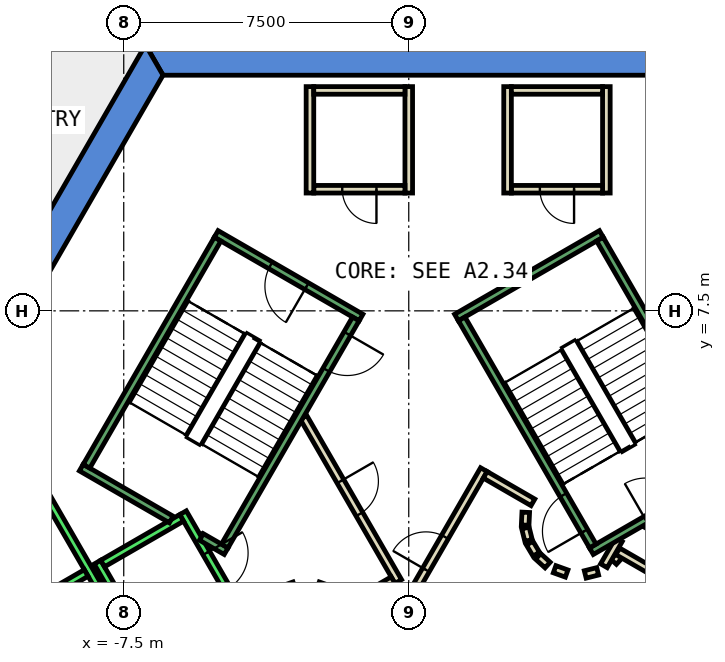
"""IFC4 building model, lengths in metres.
Left out: names, types, materials, properties, quantities, classifications, styles, units other than length and angle.
Written with IfcOpenShell. Run it as: python <this file> out.ifc"""

import sys

from ifc_helpers import new_model, si_unit, direction, frame, frame_2d, origin, place, context, subcontext, project, spatial, polyline, rectangle, outline, extrude, element, fill, save


model = new_model("IFC4")
c1 = context("Model", 3, precision=1e-05, world=origin(), true_north=direction((0.0, 1.0)))
c2 = subcontext(c1, "Body", "Model", "MODEL_VIEW")
j1 = project(units=[si_unit("LENGTHUNIT", "METRE"), si_unit("PLANEANGLEUNIT", "RADIAN")], contexts=[c1])
p1 = place(None, origin())
s1 = spatial("IfcSite", under=j1, at=p1, CompositionType="ELEMENT")
p2 = place(p1, origin())
s2 = spatial("IfcBuilding", under=s1, at=p2, CompositionType="ELEMENT")
p3 = place(p2, frame((0.0, 0.0, 167.6)))
s3 = spatial("IfcBuildingStorey", under=s2, at=p3, CompositionType="ELEMENT", Elevation=167.6)
p4 = place(p3, frame((0.0, 0.0, -0.4)))
e1 = element("IfcWall", 1, at=p4, inside=s3, PredefinedType="SHEAR", context=c2, shape_type="SweptSolid", body=[
    extrude(outline(polyline([(6.928, 14.5), (-6.928, 14.5), (-6.466, 13.7), (6.466, 13.7), (6.928, 14.5)])), origin(), (0.0, 0.0, 1.0), 4.2),
])
p5 = place(p3, frame((0.0, 0.0, -0.4)))
e2 = element("IfcWall", 2, at=p5, inside=s3, PredefinedType="SHEAR", context=c2, shape_type="SweptSolid", body=[
    extrude(outline(polyline([(-12.267, 5.252), (-11.575, 4.852), (-6.466, 13.7), (-6.928, 14.5), (-12.267, 5.252)])), origin(), (0.0, 0.0, 1.0), 4.2),
])
p6 = place(p3, frame((0.0, 0.0, -0.4)))
e3 = element("IfcWall", 3, at=p6, inside=s3, PredefinedType="SHEAR", context=c2, shape_type="SweptSolid", body=[
    extrude(outline(polyline([(-13.856, 2.5), (-6.928, -9.5), (-6.466, -8.7), (-12.933, 2.5), (-13.856, 2.5)])), origin(), (0.0, 0.0, 1.0), 4.2),
])
p7 = place(p3, frame((5.2, 13.4, 0.0), z_axis=(0.0, 0.0, 1.0), x_axis=(0.0, -1.0, 0.0)))
e4 = element("IfcWall", 4, at=p7, inside=s3, PredefinedType="PARTITIONING", context=c2, shape_type="SweptSolid", body=[
    extrude(rectangle(XDim=2.8, YDim=0.2, at=frame_2d((1.4, 0.0))), origin(), (0.0, 0.0, 1.0), 3.8),
])
p8 = place(p3, frame((5.1, 10.7, 0.0), z_axis=(0.0, 0.0, 1.0), x_axis=(-1.0, 0.0, 0.0)))
e5 = element("IfcWall", 5, at=p8, inside=s3, PredefinedType="PARTITIONING", context=c2, shape_type="SweptSolid", body=[
    extrude(rectangle(XDim=2.4, YDim=0.2, at=frame_2d((1.2, 0.0))), origin(), (0.0, 0.0, 1.0), 3.8),
])
p9 = place(p8, frame((0.75, 0.0, 0.0)))
e6 = element("IfcOpeningElement", 6, at=p9, cuts=e5, PredefinedType="OPENING", context=c2, shape_type="SweptSolid", body=[
    extrude(rectangle(XDim=0.9, YDim=2.1, at=frame_2d((0.45, 1.05))), frame((0.0, 0.11, 0.0), z_axis=(0.0, -1.0, 0.0), x_axis=(1.0, 0.0, 0.0)), (0.0, 0.0, 1.0), 0.22),
])
p10 = place(p3, frame((2.6, 10.6, 0.0), z_axis=(0.0, 0.0, 1.0), x_axis=(0.0, 1.0, 0.0)))
e7 = element("IfcWall", 7, at=p10, inside=s3, PredefinedType="PARTITIONING", context=c2, shape_type="SweptSolid", body=[
    extrude(rectangle(XDim=2.8, YDim=0.2, at=frame_2d((1.4, 0.0))), origin(), (0.0, 0.0, 1.0), 3.8),
])
p11 = place(p3, frame((2.7, 13.3, 0.0), z_axis=(0.0, 0.0, 1.0), x_axis=(1.0, 0.0, 0.0)))
e8 = element("IfcWall", 8, at=p11, inside=s3, PredefinedType="PARTITIONING", context=c2, shape_type="SweptSolid", body=[
    extrude(rectangle(XDim=2.4, YDim=0.2, at=frame_2d((1.2, 0.0))), origin(), (0.0, 0.0, 1.0), 3.8),
])
p12 = place(p3, frame((0.0, 13.4, 0.0), z_axis=(0.0, 0.0, 1.0), x_axis=(0.0, -1.0, 0.0)))
e9 = element("IfcWall", 9, at=p12, inside=s3, PredefinedType="PARTITIONING", context=c2, shape_type="SweptSolid", body=[
    extrude(rectangle(XDim=2.8, YDim=0.2, at=frame_2d((1.4, 0.0))), origin(), (0.0, 0.0, 1.0), 3.8),
])
p13 = place(p3, frame((-0.1, 10.7, 0.0), z_axis=(0.0, 0.0, 1.0), x_axis=(-1.0, 0.0, 0.0)))
e10 = element("IfcWall", 10, at=p13, inside=s3, PredefinedType="PARTITIONING", context=c2, shape_type="SweptSolid", body=[
    extrude(rectangle(XDim=2.4, YDim=0.2, at=frame_2d((1.2, 0.0))), origin(), (0.0, 0.0, 1.0), 3.8),
])
p14 = place(p13, frame((0.75, 0.0, 0.0)))
e11 = element("IfcOpeningElement", 11, at=p14, cuts=e10, PredefinedType="OPENING", context=c2, shape_type="SweptSolid", body=[
    extrude(rectangle(XDim=0.9, YDim=2.1, at=frame_2d((0.45, 1.05))), frame((0.0, 0.11, 0.0), z_axis=(0.0, -1.0, 0.0), x_axis=(1.0, 0.0, 0.0)), (0.0, 0.0, 1.0), 0.22),
])
p15 = place(p3, frame((-2.6, 10.6, 0.0), z_axis=(0.0, 0.0, 1.0), x_axis=(0.0, 1.0, 0.0)))
e12 = element("IfcWall", 12, at=p15, inside=s3, PredefinedType="PARTITIONING", context=c2, shape_type="SweptSolid", body=[
    extrude(rectangle(XDim=2.8, YDim=0.2, at=frame_2d((1.4, 0.0))), origin(), (0.0, 0.0, 1.0), 3.8),
])
p16 = place(p3, frame((-2.5, 13.3, 0.0), z_axis=(0.0, 0.0, 1.0), x_axis=(1.0, 0.0, 0.0)))
e13 = element("IfcWall", 13, at=p16, inside=s3, PredefinedType="PARTITIONING", context=c2, shape_type="SweptSolid", body=[
    extrude(rectangle(XDim=2.4, YDim=0.2, at=frame_2d((1.2, 0.0))), origin(), (0.0, 0.0, 1.0), 3.8),
])
p17 = place(p3, frame((5.39, 0.898, 0.0), z_axis=(0.0, 0.0, 1.0), x_axis=(0.673828488714, 0.738887791073, 0.0)))
e14 = element("IfcWall", 14, at=p17, inside=s3, PredefinedType="PARTITIONING", context=c2, shape_type="SweptSolid", body=[
    extrude(rectangle(XDim=0.263, YDim=0.2, at=frame_2d((0.131, 0.0))), origin(), (0.0, 0.0, 1.0), 3.8),
])
p18 = place(p3, frame((5.499, 1.172, 0.0), z_axis=(0.0, 0.0, 1.0), x_axis=(0.866333505267, -0.499465972466, 0.0)))
e15 = element("IfcWall", 15, at=p18, inside=s3, PredefinedType="PARTITIONING", context=c2, shape_type="SweptSolid", body=[
    extrude(rectangle(XDim=1.374, YDim=0.2, at=frame_2d((0.687, 0.0))), origin(), (0.0, 0.0, 1.0), 3.8),
])
p19 = place(p3, frame((6.826, 0.522, 0.0), z_axis=(0.0, 0.0, 1.0), x_axis=(-0.500016722714, -0.866015748706, 0.0)))
e16 = element("IfcWall", 16, at=p19, inside=s3, PredefinedType="PARTITIONING", context=c2, shape_type="SweptSolid", body=[
    extrude(rectangle(XDim=1.7, YDim=0.2, at=frame_2d((0.85, 0.0))), origin(), (0.0, 0.0, 1.0), 3.8),
])
p20 = place(p3, frame((6.25, 1.894, 0.0), z_axis=(0.0, 0.0, 1.0), x_axis=(0.866043184279, -0.499969202016, 0.0)))
e17 = element("IfcWall", 17, at=p20, inside=s3, PredefinedType="PARTITIONING", context=c2, shape_type="SweptSolid", body=[
    extrude(rectangle(XDim=2.084, YDim=0.2, at=frame_2d((1.042, 0.0))), origin(), (0.0, 0.0, 1.0), 3.8),
])
p21 = place(p20, frame((0.642, 0.0, 0.0)))
e18 = element("IfcOpeningElement", 18, at=p21, cuts=e17, PredefinedType="OPENING", context=c2, shape_type="SweptSolid", body=[
    extrude(rectangle(XDim=0.9, YDim=2.1, at=frame_2d((0.45, 1.05))), frame((0.0, 0.11, 0.0), z_axis=(0.0, -1.0, 0.0), x_axis=(1.0, 0.0, 0.0)), (0.0, 0.0, 1.0), 0.22),
])
p22 = place(p3, frame((5.135, 0.793, 0.0), z_axis=(0.0, 0.0, 1.0), x_axis=(0.499526442893, 0.866298639529, 0.0)))
e19 = element("IfcWall", 19, at=p22, inside=s3, PredefinedType="PARTITIONING", context=c2, shape_type="SweptSolid", body=[
    extrude(rectangle(XDim=0.791, YDim=0.2, at=frame_2d((0.396, 0.0))), origin(), (0.0, 0.0, 1.0), 3.8),
])
p23 = place(p3, frame((-0.52, -1.0, 0.0), z_axis=(0.0, 0.0, 1.0), x_axis=(0.50011622646, 0.865958290007, 0.0)))
e20 = element("IfcWall", 20, at=p23, inside=s3, PredefinedType="PARTITIONING", context=c2, shape_type="SweptSolid", body=[
    extrude(rectangle(XDim=4.991, YDim=0.2, at=frame_2d((2.496, 0.0))), origin(), (0.0, 0.0, 1.0), 3.8),
])
p24 = place(p23, frame((1.945, 0.0, 0.0)))
e21 = element("IfcOpeningElement", 21, at=p24, cuts=e20, PredefinedType="OPENING", context=c2, shape_type="SweptSolid", body=[
    extrude(rectangle(XDim=1.0, YDim=2.1, at=frame_2d((0.5, 1.05))), frame((0.0, 0.11, 0.0), z_axis=(0.0, -1.0, 0.0), x_axis=(1.0, 0.0, 0.0)), (0.0, 0.0, 1.0), 0.22),
])
p25 = place(p3, frame((2.012, 3.186, 0.0), z_axis=(0.0, 0.0, 1.0), x_axis=(0.865891012941, -0.500232699559, 0.0)))
e22 = element("IfcWall", 22, at=p25, inside=s3, PredefinedType="PARTITIONING", context=c2, shape_type="SweptSolid", body=[
    extrude(rectangle(XDim=1.449, YDim=0.2, at=frame_2d((0.725, 0.0))), origin(), (0.0, 0.0, 1.0), 3.8),
])
p26 = place(p3, frame((3.079, 2.199, 0.0), z_axis=(0.0, 0.0, 1.0), x_axis=(-0.047771483479, -0.998858290933, 0.0)))
e23 = element("IfcWall", 23, at=p26, inside=s3, PredefinedType="PARTITIONING", context=c2, shape_type="SweptSolid", body=[
    extrude(rectangle(XDim=0.337, YDim=0.2, at=frame_2d((0.169, 0.0))), origin(), (0.0, 0.0, 1.0), 3.8),
])
p27 = place(p3, frame((3.07, 1.786, 0.0), z_axis=(0.0, 0.0, 1.0), x_axis=(0.242705583207, -0.970099994784, 0.0)))
e24 = element("IfcWall", 24, at=p27, inside=s3, PredefinedType="PARTITIONING", context=c2, shape_type="SweptSolid", body=[
    extrude(rectangle(XDim=0.338, YDim=0.2, at=frame_2d((0.169, 0.0))), origin(), (0.0, 0.0, 1.0), 3.8),
])
for number, where, z_axis, x_axis in (
    (25, (3.182, 1.388, 0.0), (0.0, 0.0, 1.0), (0.512, -0.859, 0.0)),
    (26, (3.404, 1.039, 0.0), (0.0, 0.0, 1.0), (0.74, -0.672, 0.0)),
):
    element("IfcWall", number, at=place(p3, frame(where, z_axis=z_axis, x_axis=x_axis)), inside=s3, PredefinedType="PARTITIONING", context=c2, shape_type="SweptSolid", body=[
        extrude(rectangle(XDim=0.338, YDim=0.2, at=frame_2d((0.169, 0.0))), origin(), (0.0, 0.0, 1.0), 3.8),
    ])
p28 = place(p3, frame((3.838, 0.702, 0.0), z_axis=(0.0, 0.0, 1.0), x_axis=(0.941035081519, -0.338308993895, 0.0)))
e27 = element("IfcWall", 27, at=p28, inside=s3, PredefinedType="PARTITIONING", context=c2, shape_type="SweptSolid", body=[
    extrude(rectangle(XDim=0.337, YDim=0.2, at=frame_2d((0.168, 0.0))), origin(), (0.0, 0.0, 1.0), 3.8),
])
p29 = place(p3, frame((4.644, 0.564, 0.0), z_axis=(0.0, 0.0, 1.0), x_axis=(0.969929076366, 0.243387729394, 0.0)))
e28 = element("IfcWall", 28, at=p29, inside=s3, PredefinedType="PARTITIONING", context=c2, shape_type="SweptSolid", body=[
    extrude(rectangle(XDim=0.337, YDim=0.2, at=frame_2d((0.168, 0.0))), origin(), (0.0, 0.0, 1.0), 3.8),
])
p30 = place(p3, frame((-2.771, 4.7, 0.0), z_axis=(0.0, 0.0, 1.0), x_axis=(0.499969479948, -0.866043023828, 0.0)))
e29 = element("IfcWall", 29, at=p30, inside=s3, PredefinedType="PARTITIONING", context=c2, shape_type="SweptSolid", body=[
    extrude(rectangle(XDim=4.99, YDim=0.2, at=frame_2d((2.495, 0.0))), origin(), (0.0, 0.0, 1.0), 3.8),
])
p31 = place(p30, frame((1.945, 0.0, 0.0)))
e30 = element("IfcOpeningElement", 30, at=p31, cuts=e29, PredefinedType="OPENING", context=c2, shape_type="SweptSolid", body=[
    extrude(rectangle(XDim=1.0, YDim=2.1, at=frame_2d((0.5, 1.05))), frame((0.0, 0.11, 0.0), z_axis=(0.0, -1.0, 0.0), x_axis=(1.0, 0.0, 0.0)), (0.0, 0.0, 1.0), 0.22),
])
p32 = place(p3, frame((-0.412, 0.414, 0.0), z_axis=(0.0, 0.0, 1.0), x_axis=(-0.866017369001, -0.500013916395, 0.0)))
e31 = element("IfcWall", 31, at=p32, inside=s3, PredefinedType="PARTITIONING", context=c2, shape_type="SweptSolid", body=[
    extrude(rectangle(XDim=1.45, YDim=0.2, at=frame_2d((0.725, 0.0))), origin(), (0.0, 0.0, 1.0), 3.8),
])
p33 = place(p3, frame((-2.07, 0.16, 0.0), z_axis=(0.0, 0.0, 1.0), x_axis=(-0.942199461132, 0.335052496547, 0.0)))
e32 = element("IfcWall", 32, at=p33, inside=s3, PredefinedType="PARTITIONING", context=c2, shape_type="SweptSolid", body=[
    extrude(rectangle(XDim=0.337, YDim=0.2, at=frame_2d((0.169, 0.0))), origin(), (0.0, 0.0, 1.0), 3.8),
])
p34 = place(p3, frame((-3.012, 0.273, 0.0), z_axis=(0.0, 0.0, 1.0), x_axis=(-0.942280615813, -0.334824194261, 0.0)))
e33 = element("IfcWall", 33, at=p34, inside=s3, PredefinedType="PARTITIONING", context=c2, shape_type="SweptSolid", body=[
    extrude(rectangle(XDim=0.338, YDim=0.2, at=frame_2d((0.169, 0.0))), origin(), (0.0, 0.0, 1.0), 3.8),
])
p35 = place(p3, frame((-5.94, 2.188, 0.0), z_axis=(0.0, 0.0, 1.0), x_axis=(0.49994636267, -0.866056369097, 0.0)))
e34 = element("IfcWall", 34, at=p35, inside=s3, PredefinedType="STANDARD", context=c2, shape_type="SweptSolid", body=[
    extrude(rectangle(XDim=2.8, YDim=0.2, at=frame_2d((1.4, 0.0))), origin(), (0.0, 0.0, 1.0), 3.8),
])
p36 = place(p35, frame((1.225, 0.0, 0.0)))
e35 = element("IfcOpeningElement", 35, at=p36, cuts=e34, PredefinedType="OPENING", context=c2, shape_type="SweptSolid", body=[
    extrude(rectangle(XDim=1.1, YDim=2.1, at=frame_2d((0.55, 1.05))), frame((0.0, 0.11, 0.0), z_axis=(0.0, -1.0, 0.0), x_axis=(1.0, 0.0, 0.0)), (0.0, 0.0, 1.0), 0.22),
])
p37 = place(p3, frame((-8.192, 0.888, 0.0), z_axis=(0.0, 0.0, 1.0), x_axis=(0.49994636267, -0.866056369097, 0.0)))
e36 = element("IfcWall", 36, at=p37, inside=s3, PredefinedType="STANDARD", context=c2, shape_type="SweptSolid", body=[
    extrude(rectangle(XDim=2.8, YDim=0.2, at=frame_2d((1.4, 0.0))), origin(), (0.0, 0.0, 1.0), 3.8),
])
p38 = place(p3, frame((-5.977, 2.052, 0.0), z_axis=(0.0, 0.0, 1.0), x_axis=(-0.865973769406, -0.500089422704, 0.0)))
e37 = element("IfcWall", 37, at=p38, inside=s3, PredefinedType="STANDARD", context=c2, shape_type="SweptSolid", body=[
    extrude(rectangle(XDim=2.399, YDim=0.2, at=frame_2d((1.2, 0.0))), origin(), (0.0, 0.0, 1.0), 3.8),
])
p39 = place(p3, frame((-9.751, 2.99, 0.0), z_axis=(0.0, 0.0, 1.0), x_axis=(0.50000090737, -0.866024879913, 0.0)))
e38 = element("IfcWall", 38, at=p39, inside=s3, PredefinedType="STANDARD", context=c2, shape_type="SweptSolid", body=[
    extrude(rectangle(XDim=10.6, YDim=0.2, at=frame_2d((5.3, 0.0))), origin(), (0.0, 0.0, 1.0), 3.8),
])
p40 = place(p3, frame((-8.488, 0.602, 0.0), z_axis=(0.0, 0.0, 1.0), x_axis=(-0.866022959057, -0.500004234368, 0.0)))
e39 = element("IfcWall", 39, at=p40, inside=s3, PredefinedType="STANDARD", context=c2, shape_type="SweptSolid", body=[
    extrude(rectangle(XDim=2.5, YDim=0.2, at=frame_2d((1.25, 0.0))), origin(), (0.0, 0.0, 1.0), 3.8),
])
p41 = place(p3, frame((4.451, -6.19, 0.0), z_axis=(0.0, 0.0, 1.0), x_axis=(0.50000090737, 0.866024879913, 0.0)))
e40 = element("IfcWall", 40, at=p41, inside=s3, PredefinedType="STANDARD", context=c2, shape_type="SweptSolid", body=[
    extrude(rectangle(XDim=10.6, YDim=0.2, at=frame_2d((5.3, 0.0))), origin(), (0.0, 0.0, 1.0), 3.8),
])
p42 = place(p3, frame((4.806, 1.176, 0.0), z_axis=(0.0, 0.0, 1.0), x_axis=(0.866059941101, 0.499940174841, 0.0)))
e41 = element("IfcWall", 41, at=p42, inside=s3, PredefinedType="STANDARD", context=c2, shape_type="SweptSolid", body=[
    extrude(rectangle(XDim=4.4, YDim=0.2, at=frame_2d((2.2, 0.0))), origin(), (0.0, 0.0, 1.0), 3.8),
])
p43 = place(p42, frame((1.65, 0.0, 0.0)))
e42 = element("IfcOpeningElement", 42, at=p43, cuts=e41, PredefinedType="OPENING", context=c2, shape_type="SweptSolid", body=[
    extrude(rectangle(XDim=1.1, YDim=2.2, at=frame_2d((0.55, 1.1))), frame((0.0, 0.11, 0.0), z_axis=(0.0, -1.0, 0.0), x_axis=(1.0, 0.0, 0.0)), (0.0, 0.0, 1.0), 0.22),
])
p44 = place(p3, frame((1.256, 7.324, 0.0), z_axis=(0.0, 0.0, 1.0), x_axis=(0.866046073146, 0.499964197906, 0.0)))
e43 = element("IfcWall", 43, at=p44, inside=s3, PredefinedType="STANDARD", context=c2, shape_type="SweptSolid", body=[
    extrude(rectangle(XDim=4.4, YDim=0.2, at=frame_2d((2.2, 0.0))), origin(), (0.0, 0.0, 1.0), 3.8),
])
p45 = place(p3, frame((4.843, 1.312, 0.0), z_axis=(0.0, 0.0, 1.0), x_axis=(-0.499963383562, 0.866046543262, 0.0)))
e44 = element("IfcWall", 44, at=p45, inside=s3, PredefinedType="STANDARD", context=c2, shape_type="SweptSolid", body=[
    extrude(rectangle(XDim=6.9, YDim=0.2, at=frame_2d((3.45, 0.0))), origin(), (0.0, 0.0, 1.0), 3.8),
])
p46 = place(p45, frame((0.45, 0.0, 0.0)))
e45 = element("IfcOpeningElement", 45, at=p46, cuts=e44, PredefinedType="OPENING", context=c2, shape_type="SweptSolid", body=[
    extrude(rectangle(XDim=1.1, YDim=2.2, at=frame_2d((0.55, 1.1))), frame((0.0, 0.11, 0.0), z_axis=(0.0, -1.0, 0.0), x_axis=(1.0, 0.0, 0.0)), (0.0, 0.0, 1.0), 0.22),
])
p47 = place(p3, frame((8.48, 3.412, 0.0), z_axis=(0.0, 0.0, 1.0), x_axis=(-0.499978703459, 0.866037698999, 0.0)))
e46 = element("IfcWall", 46, at=p47, inside=s3, PredefinedType="STANDARD", context=c2, shape_type="SweptSolid", body=[
    extrude(rectangle(XDim=6.9, YDim=0.2, at=frame_2d((3.45, 0.0))), origin(), (0.0, 0.0, 1.0), 3.8),
])
p48 = place(p3, frame((-1.256, 7.324, 0.0), z_axis=(0.0, 0.0, 1.0), x_axis=(-0.866046073146, 0.499964197906, 0.0)))
e47 = element("IfcWall", 47, at=p48, inside=s3, PredefinedType="STANDARD", context=c2, shape_type="SweptSolid", body=[
    extrude(rectangle(XDim=4.4, YDim=0.2, at=frame_2d((2.2, 0.0))), origin(), (0.0, 0.0, 1.0), 3.8),
])
p49 = place(p48, frame((1.65, 0.0, 0.0)))
e48 = element("IfcOpeningElement", 48, at=p49, cuts=e47, PredefinedType="OPENING", context=c2, shape_type="SweptSolid", body=[
    extrude(rectangle(XDim=1.1, YDim=2.2, at=frame_2d((0.55, 1.1))), frame((0.0, 0.11, 0.0), z_axis=(0.0, -1.0, 0.0), x_axis=(1.0, 0.0, 0.0)), (0.0, 0.0, 1.0), 0.22),
])
p50 = place(p3, frame((-6.25, 2.01, 0.0), z_axis=(0.0, 0.0, 1.0), x_axis=(-0.86611865017, 0.499838457731, 0.0)))
e49 = element("IfcWall", 49, at=p50, inside=s3, PredefinedType="STANDARD", context=c2, shape_type="SweptSolid", body=[
    extrude(rectangle(XDim=2.733, YDim=0.2, at=frame_2d((1.366, 0.0))), origin(), (0.0, 0.0, 1.0), 3.8),
])
p51 = place(p3, frame((-4.806, 1.176, 0.0), z_axis=(0.0, 0.0, 1.0), x_axis=(-0.866558586415, 0.499075361355, 0.0)))
e50 = element("IfcWall", 50, at=p51, inside=s3, PredefinedType="STANDARD", context=c2, shape_type="SweptSolid", body=[
    extrude(rectangle(XDim=0.751, YDim=0.2, at=frame_2d((0.376, 0.0))), origin(), (0.0, 0.0, 1.0), 3.8),
])
p52 = place(p3, frame((-1.393, 7.288, 0.0), z_axis=(0.0, 0.0, 1.0), x_axis=(-0.499963383562, -0.866046543262, 0.0)))
e51 = element("IfcWall", 51, at=p52, inside=s3, PredefinedType="STANDARD", context=c2, shape_type="SweptSolid", body=[
    extrude(rectangle(XDim=6.9, YDim=0.2, at=frame_2d((3.45, 0.0))), origin(), (0.0, 0.0, 1.0), 3.8),
])
p53 = place(p52, frame((0.45, 0.0, 0.0)))
e52 = element("IfcOpeningElement", 52, at=p53, cuts=e51, PredefinedType="OPENING", context=c2, shape_type="SweptSolid", body=[
    extrude(rectangle(XDim=1.1, YDim=2.2, at=frame_2d((0.55, 1.1))), frame((0.0, 0.11, 0.0), z_axis=(0.0, -1.0, 0.0), x_axis=(1.0, 0.0, 0.0)), (0.0, 0.0, 1.0), 0.22),
])
p54 = place(p3, frame((-5.03, 9.388, 0.0), z_axis=(0.0, 0.0, 1.0), x_axis=(-0.499978703459, -0.866037698999, 0.0)))
e53 = element("IfcWall", 53, at=p54, inside=s3, PredefinedType="STANDARD", context=c2, shape_type="SweptSolid", body=[
    extrude(rectangle(XDim=6.9, YDim=0.2, at=frame_2d((3.45, 0.0))), origin(), (0.0, 0.0, 1.0), 3.8),
])
p55 = place(p24, origin())
e54 = element("IfcDoor", 54, at=p55, inside=s3, OperationType="SINGLE_SWING_LEFT", PredefinedType="DOOR", context=c2, shape_type="SweptSolid", body=[
    extrude(rectangle(XDim=1.0, YDim=2.1, at=frame_2d((0.5, 1.05))), frame((0.0, 0.025, 0.0), z_axis=(0.0, -1.0, 0.0), x_axis=(1.0, 0.0, 0.0)), (0.0, 0.0, 1.0), 0.05),
])
fill(e21, e54)
p56 = place(p31, origin())
e55 = element("IfcDoor", 55, at=p56, inside=s3, OperationType="SINGLE_SWING_RIGHT", PredefinedType="DOOR", context=c2, shape_type="SweptSolid", body=[
    extrude(rectangle(XDim=1.0, YDim=2.1, at=frame_2d((0.5, 1.05))), frame((0.0, 0.025, 0.0), z_axis=(0.0, -1.0, 0.0), x_axis=(1.0, 0.0, 0.0)), (0.0, 0.0, 1.0), 0.05),
])
fill(e30, e55)
p57 = place(p9, origin())
e56 = element("IfcDoor", 56, at=p57, inside=s3, OperationType="SINGLE_SWING_RIGHT", PredefinedType="DOOR", context=c2, shape_type="SweptSolid", body=[
    extrude(rectangle(XDim=0.9, YDim=2.1, at=frame_2d((0.45, 1.05))), frame((0.0, 0.025, 0.0), z_axis=(0.0, -1.0, 0.0), x_axis=(1.0, 0.0, 0.0)), (0.0, 0.0, 1.0), 0.05),
])
fill(e6, e56)
p58 = place(p14, origin())
e57 = element("IfcDoor", 57, at=p58, inside=s3, OperationType="SINGLE_SWING_RIGHT", PredefinedType="DOOR", context=c2, shape_type="SweptSolid", body=[
    extrude(rectangle(XDim=0.9, YDim=2.1, at=frame_2d((0.45, 1.05))), frame((0.0, 0.025, 0.0), z_axis=(0.0, -1.0, 0.0), x_axis=(1.0, 0.0, 0.0)), (0.0, 0.0, 1.0), 0.05),
])
fill(e11, e57)
p59 = place(p36, origin())
e58 = element("IfcDoor", 58, at=p59, inside=s3, OperationType="SLIDING_TO_LEFT", PredefinedType="DOOR", context=c2, shape_type="SweptSolid", body=[
    extrude(rectangle(XDim=1.1, YDim=2.1, at=frame_2d((0.55, 1.05))), frame((0.0, 0.025, 0.0), z_axis=(0.0, -1.0, 0.0), x_axis=(1.0, 0.0, 0.0)), (0.0, 0.0, 1.0), 0.05),
])
fill(e35, e58)
p60 = place(p46, origin())
e59 = element("IfcDoor", 59, at=p60, inside=s3, OperationType="SINGLE_SWING_LEFT", PredefinedType="DOOR", context=c2, shape_type="SweptSolid", body=[
    extrude(rectangle(XDim=1.1, YDim=2.2, at=frame_2d((0.55, 1.1))), frame((0.0, 0.025, 0.0), z_axis=(0.0, -1.0, 0.0), x_axis=(1.0, 0.0, 0.0)), (0.0, 0.0, 1.0), 0.05),
])
fill(e45, e59)
p61 = place(p53, origin())
e60 = element("IfcDoor", 60, at=p61, inside=s3, OperationType="SINGLE_SWING_LEFT", PredefinedType="DOOR", context=c2, shape_type="SweptSolid", body=[
    extrude(rectangle(XDim=1.1, YDim=2.2, at=frame_2d((0.55, 1.1))), frame((0.0, 0.025, 0.0), z_axis=(0.0, -1.0, 0.0), x_axis=(1.0, 0.0, 0.0)), (0.0, 0.0, 1.0), 0.05),
])
fill(e52, e60)
p62 = place(p49, origin())
e61 = element("IfcDoor", 61, at=p62, inside=s3, OperationType="SINGLE_SWING_LEFT", PredefinedType="DOOR", context=c2, shape_type="SweptSolid", body=[
    extrude(rectangle(XDim=1.1, YDim=2.2, at=frame_2d((0.55, 1.1))), frame((0.0, 0.025, 0.0), z_axis=(0.0, -1.0, 0.0), x_axis=(1.0, 0.0, 0.0)), (0.0, 0.0, 1.0), 0.05),
])
fill(e48, e61)
save(model, sys.argv[1])
